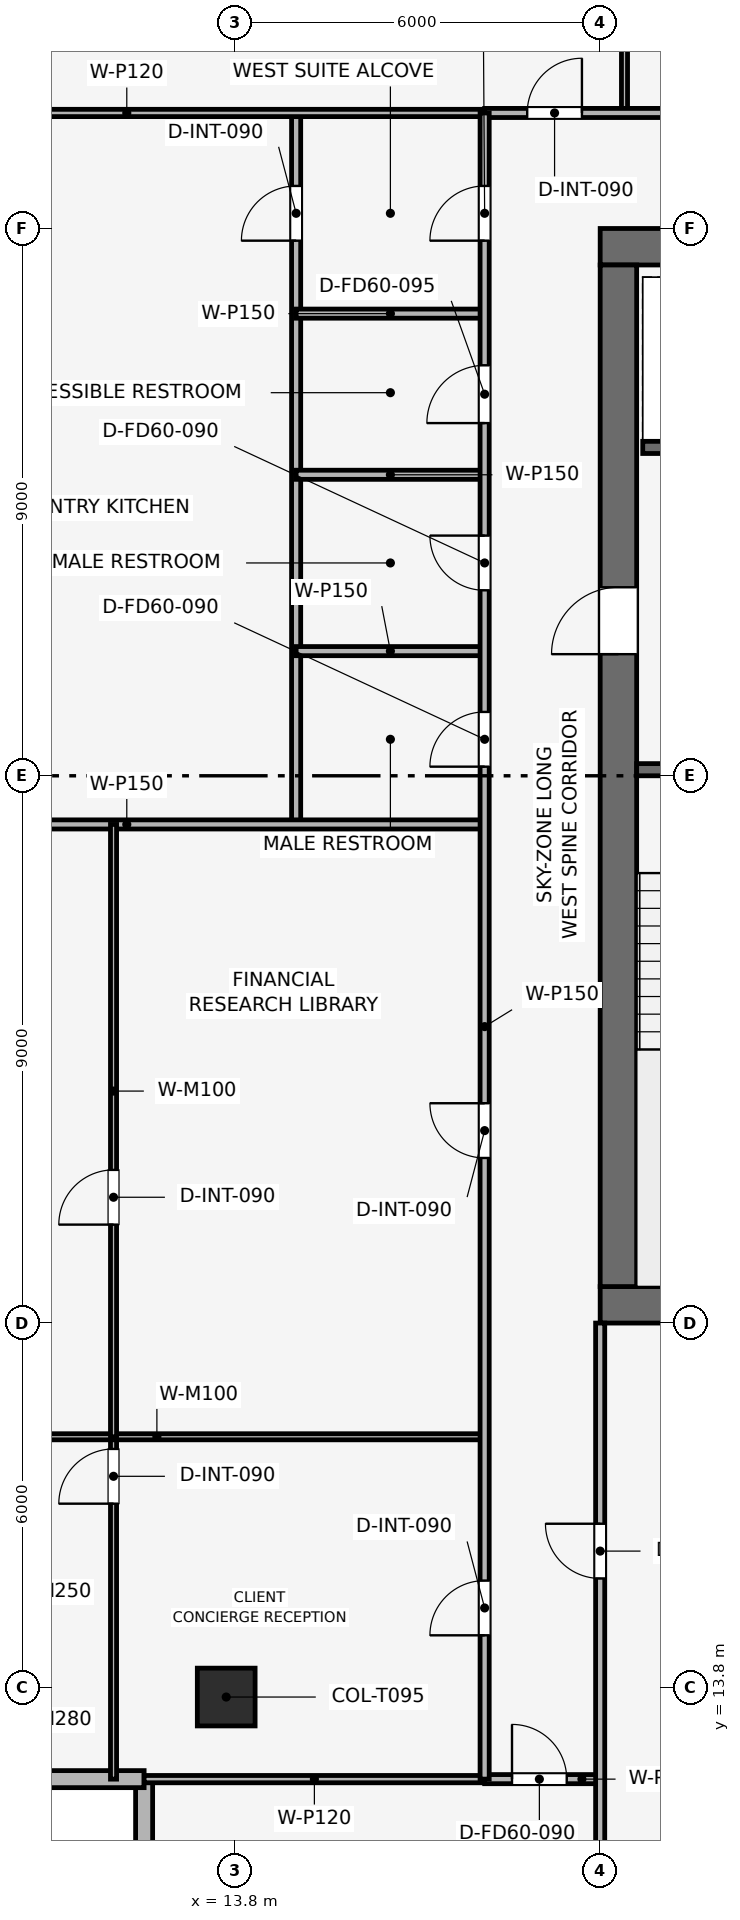
"""IFC4 building model, lengths in metres.
Left out: names, types, materials, properties, quantities, classifications, styles, units other than length and angle.
Written with IfcOpenShell. Run it as: python <this file> out.ifc"""

import sys

from ifc_helpers import new_model, si_unit, direction, frame, frame_2d, origin, origin_2d, place, context, subcontext, project, spatial, rectangle, extrude, element, fill, save


model = new_model("IFC4")
c1 = context("Model", 3, precision=1e-05, world=origin(), true_north=direction((0.0, 1.0)))
c2 = subcontext(c1, "Body", "Model", "MODEL_VIEW")
j1 = project(units=[si_unit("LENGTHUNIT", "METRE"), si_unit("PLANEANGLEUNIT", "RADIAN")], contexts=[c1])
p1 = place(None, origin())
s1 = spatial("IfcSite", under=j1, at=p1, CompositionType="ELEMENT")
p2 = place(p1, origin())
s2 = spatial("IfcBuilding", under=s1, at=p2, CompositionType="ELEMENT")
p3 = place(p2, frame((0.0, 0.0, 314.25)))
s3 = spatial("IfcBuildingStorey", under=s2, at=p3, CompositionType="ELEMENT", Elevation=314.25)
p4 = place(p3, frame((19.8, 20.1, 0.0), z_axis=(0.0, 0.0, 1.0), x_axis=(1.0, 0.0, 0.0)))
e1 = element("IfcWall", 1, at=p4, inside=s3, PredefinedType="SHEAR", context=c2, shape_type="SweptSolid", body=[
    extrude(rectangle(XDim=18.0, YDim=0.6, at=frame_2d((9.0, 0.0))), origin(), (0.0, 0.0, 1.0), 3.75),
])
p5 = place(p3, frame((19.8, 37.5, 0.0), z_axis=(0.0, 0.0, 1.0), x_axis=(1.0, 0.0, 0.0)))
e2 = element("IfcWall", 2, at=p5, inside=s3, PredefinedType="SHEAR", context=c2, shape_type="SweptSolid", body=[
    extrude(rectangle(XDim=18.0, YDim=0.6, at=frame_2d((9.0, 0.0))), origin(), (0.0, 0.0, 1.0), 3.75),
])
p6 = place(p5, frame((7.05, 0.0, 0.0)))
e3 = element("IfcOpeningElement", 3, at=p6, cuts=e2, PredefinedType="OPENING", context=c2, shape_type="SweptSolid", body=[
    extrude(rectangle(XDim=1.1, YDim=2.15, at=frame_2d((0.55, 1.075))), frame((0.0, 0.31, 0.0), z_axis=(0.0, -1.0, 0.0), x_axis=(1.0, 0.0, 0.0)), (0.0, 0.0, 1.0), 0.62),
])
p7 = place(p3, frame((20.1, 20.4, 0.0), z_axis=(0.0, 0.0, 1.0), x_axis=(0.0, 1.0, 0.0)))
e4 = element("IfcWall", 4, at=p7, inside=s3, PredefinedType="SHEAR", context=c2, shape_type="SweptSolid", body=[
    extrude(rectangle(XDim=16.8, YDim=0.6, at=frame_2d((8.4, 0.0))), origin(), (0.0, 0.0, 1.0), 3.75),
])
p8 = place(p7, frame((10.4, 0.0, 0.0)))
e5 = element("IfcOpeningElement", 5, at=p8, cuts=e4, PredefinedType="OPENING", context=c2, shape_type="SweptSolid", body=[
    extrude(rectangle(XDim=1.1, YDim=2.15, at=frame_2d((0.55, 1.075))), frame((0.0, 0.31, 0.0), z_axis=(0.0, -1.0, 0.0), x_axis=(1.0, 0.0, 0.0)), (0.0, 0.0, 1.0), 0.62),
])
p9 = place(p3, frame((13.65, 13.65, 0.003), z_axis=(0.0, 0.0, 1.0), x_axis=(1.0, 0.0, 0.0)))
e6 = element("IfcColumn", 6, at=p9, inside=s3, PredefinedType="COLUMN", context=c2, shape_type="SweptSolid", body=[
    extrude(rectangle(XDim=0.95, YDim=0.95, at=origin_2d()), origin(), (0.0, 0.0, 1.0), 3.504),
])
p10 = place(p3, frame((12.3, 6.13, 0.0), z_axis=(0.0, 0.0, 1.0), x_axis=(0.0, 1.0, 0.0)))
e7 = element("IfcWall", 7, at=p10, inside=s3, PredefinedType="SOLIDWALL", context=c2, shape_type="SweptSolid", body=[
    extrude(rectangle(XDim=6.17, YDim=0.28, at=frame_2d((3.085, 0.0))), origin(), (0.0, 0.0, 1.0), 3.51),
])
p11 = place(p10, frame((1.835, 0.0, 0.9)))
e8 = element("IfcOpeningElement", 8, at=p11, cuts=e7, PredefinedType="OPENING", context=c2, shape_type="SweptSolid", body=[
    extrude(rectangle(XDim=2.5, YDim=1.9, at=frame_2d((1.25, 0.95))), frame((0.0, 0.15, 0.0), z_axis=(0.0, -1.0, 0.0), x_axis=(1.0, 0.0, 0.0)), (0.0, 0.0, 1.0), 0.3),
])
p12 = place(p3, frame((12.3, 12.3, 0.0), z_axis=(0.0, 0.0, 1.0), x_axis=(-1.0, 0.0, 0.0)))
e9 = element("IfcWall", 9, at=p12, inside=s3, PredefinedType="SOLIDWALL", context=c2, shape_type="SweptSolid", body=[
    extrude(rectangle(XDim=6.17, YDim=0.28, at=frame_2d((3.085, 0.0))), origin(), (0.0, 0.0, 1.0), 3.51),
])
p13 = place(p12, frame((1.835, 0.0, 0.9)))
e10 = element("IfcOpeningElement", 10, at=p13, cuts=e9, PredefinedType="OPENING", context=c2, shape_type="SweptSolid", body=[
    extrude(rectangle(XDim=2.5, YDim=1.9, at=frame_2d((1.25, 0.95))), frame((0.0, 0.15, 0.0), z_axis=(0.0, -1.0, 0.0), x_axis=(1.0, 0.0, 0.0)), (0.0, 0.0, 1.0), 0.3),
])
p14 = place(p3, frame((20.4, 28.9, 0.0), z_axis=(0.0, 0.0, 1.0), x_axis=(1.0, 0.0, 0.0)))
e11 = element("IfcWall", 11, at=p14, inside=s3, PredefinedType="SHEAR", context=c2, shape_type="SweptSolid", body=[
    extrude(rectangle(XDim=3.15, YDim=0.2, at=frame_2d((1.575, 0.0))), origin(), (0.0, 0.0, 1.0), 3.51),
])
p15 = place(p14, frame((0.8, 0.0, 0.0)))
e12 = element("IfcOpeningElement", 12, at=p15, cuts=e11, PredefinedType="OPENING", context=c2, shape_type="SweptSolid", body=[
    extrude(rectangle(XDim=1.0, YDim=2.1, at=frame_2d((0.5, 1.05))), frame((0.0, 0.11, 0.0), z_axis=(0.0, -1.0, 0.0), x_axis=(1.0, 0.0, 0.0)), (0.0, 0.0, 1.0), 0.22),
])
p16 = place(p3, frame((20.5, 34.2, 0.0), z_axis=(0.0, 0.0, 1.0), x_axis=(1.0, 0.0, 0.0)))
e13 = element("IfcWall", 13, at=p16, inside=s3, PredefinedType="SHEAR", context=c2, shape_type="SweptSolid", body=[
    extrude(rectangle(XDim=3.05, YDim=0.2, at=frame_2d((1.525, 0.0))), origin(), (0.0, 0.0, 1.0), 3.51),
])
p17 = place(p16, frame((0.75, 0.0, 0.0)))
e14 = element("IfcOpeningElement", 14, at=p17, cuts=e13, PredefinedType="OPENING", context=c2, shape_type="SweptSolid", body=[
    extrude(rectangle(XDim=1.1, YDim=2.15, at=frame_2d((0.55, 1.075))), frame((0.0, 0.11, 0.0), z_axis=(0.0, -1.0, 0.0), x_axis=(1.0, 0.0, 0.0)), (0.0, 0.0, 1.0), 0.22),
])
p18 = place(p3, frame((20.2, 39.7, 0.0), z_axis=(0.0, 0.0, 1.0), x_axis=(0.0, 1.0, 0.0)))
e15 = element("IfcWall", 15, at=p18, inside=s3, PredefinedType="MOVABLE", context=c2, shape_type="SweptSolid", body=[
    extrude(rectangle(XDim=11.77, YDim=0.1, at=frame_2d((5.885, 0.0))), origin(), (0.0, 0.0, 1.0), 3.095),
])
p19 = place(p3, frame((14.8, 28.0, 0.0), z_axis=(0.0, 0.0, 1.0), x_axis=(0.0, 1.0, 0.0)))
e16 = element("IfcWall", 16, at=p19, inside=s3, PredefinedType="PARTITIONING", context=c2, shape_type="SweptSolid", body=[
    extrude(rectangle(XDim=11.7, YDim=0.15, at=frame_2d((5.85, 0.0))), origin(), (0.0, 0.0, 1.0), 3.095),
])
p20 = place(p19, frame((9.6, 0.0, 0.0)))
e17 = element("IfcOpeningElement", 17, at=p20, cuts=e16, PredefinedType="OPENING", context=c2, shape_type="SweptSolid", body=[
    extrude(rectangle(XDim=0.9, YDim=2.1, at=frame_2d((0.45, 1.05))), frame((0.0, 0.085, 0.0), z_axis=(0.0, -1.0, 0.0), x_axis=(1.0, 0.0, 0.0)), (0.0, 0.0, 1.0), 0.17),
])
p21 = place(p3, frame((6.13, 28.0, 0.0), z_axis=(0.0, 0.0, 1.0), x_axis=(1.0, 0.0, 0.0)))
e18 = element("IfcWall", 18, at=p21, inside=s3, PredefinedType="PARTITIONING", context=c2, shape_type="SweptSolid", body=[
    extrude(rectangle(XDim=11.77, YDim=0.15, at=frame_2d((5.885, 0.0))), origin(), (0.0, 0.0, 1.0), 3.135),
])
for number, where, z_axis, x_axis in (
    (19, (14.8, 36.4, 0.0), (0.0, 0.0, 1.0), (1.0, 0.0, 0.0)),
    (20, (14.8, 30.85, 0.0), (0.0, 0.0, 1.0), (1.0, 0.0, 0.0)),
    (21, (14.8, 33.75, 0.0), (0.0, 0.0, 1.0), (1.0, 0.0, 0.0)),
):
    element("IfcWall", number, at=place(p3, frame(where, z_axis=z_axis, x_axis=x_axis)), inside=s3, PredefinedType="PARTITIONING", context=c2, shape_type="SweptSolid", body=[
        extrude(rectangle(XDim=3.1, YDim=0.15, at=frame_2d((1.55, 0.0))), origin(), (0.0, 0.0, 1.0), 3.135),
    ])
p22 = place(p3, frame((11.797, 12.3, 0.0), z_axis=(0.0, 0.0, 1.0), x_axis=(0.0, 1.0, 0.0)))
e22 = element("IfcWall", 22, at=p22, inside=s3, PredefinedType="MOVABLE", context=c2, shape_type="SweptSolid", body=[
    extrude(rectangle(XDim=5.63, YDim=0.1, at=frame_2d((2.815, 0.0))), origin(), (0.0, 0.0, 1.0), 3.195),
])
p23 = place(p22, frame((4.53, 0.0, 0.0)))
e23 = element("IfcOpeningElement", 23, at=p23, cuts=e22, PredefinedType="OPENING", context=c2, shape_type="SweptSolid", body=[
    extrude(rectangle(XDim=0.9, YDim=2.1, at=frame_2d((0.45, 1.05))), frame((0.0, 0.06, 0.0), z_axis=(0.0, -1.0, 0.0), x_axis=(1.0, 0.0, 0.0)), (0.0, 0.0, 1.0), 0.12),
])
p24 = place(p3, frame((6.13, 17.93, 0.0), z_axis=(0.0, 0.0, 1.0), x_axis=(1.0, 0.0, 0.0)))
e24 = element("IfcWall", 24, at=p24, inside=s3, PredefinedType="MOVABLE", context=c2, shape_type="SweptSolid", body=[
    extrude(rectangle(XDim=11.77, YDim=0.1, at=frame_2d((5.885, 0.0))), origin(), (0.0, 0.0, 1.0), 3.095),
])
p25 = place(p3, frame((11.797, 17.93, 0.0), z_axis=(0.0, 0.0, 1.0), x_axis=(0.0, 1.0, 0.0)))
e25 = element("IfcWall", 25, at=p25, inside=s3, PredefinedType="MOVABLE", context=c2, shape_type="SweptSolid", body=[
    extrude(rectangle(XDim=10.07, YDim=0.1, at=frame_2d((5.035, 0.0))), origin(), (0.0, 0.0, 1.0), 3.095),
])
p26 = place(p25, frame((3.489, 0.0, 0.0)))
e26 = element("IfcOpeningElement", 26, at=p26, cuts=e25, PredefinedType="OPENING", context=c2, shape_type="SweptSolid", body=[
    extrude(rectangle(XDim=0.9, YDim=2.1, at=frame_2d((0.45, 1.05))), frame((0.0, 0.06, 0.0), z_axis=(0.0, -1.0, 0.0), x_axis=(1.0, 0.0, 0.0)), (0.0, 0.0, 1.0), 0.12),
])
p27 = place(p3, frame((12.3, 12.3, 0.0), z_axis=(0.0, 0.0, 1.0), x_axis=(1.0, 0.0, 0.0)))
e27 = element("IfcWall", 27, at=p27, inside=s3, PredefinedType="PARTITIONING", context=c2, shape_type="SweptSolid", body=[
    extrude(rectangle(XDim=5.6, YDim=0.12, at=frame_2d((2.8, 0.0))), origin(), (0.0, 0.0, 1.0), 3.195),
])
p28 = place(p3, frame((17.9, 12.3, 0.0), z_axis=(0.0, 0.0, 1.0), x_axis=(1.0, 0.0, 0.0)))
e28 = element("IfcWall", 28, at=p28, inside=s3, PredefinedType="PARTITIONING", context=c2, shape_type="SweptSolid", body=[
    extrude(rectangle(XDim=1.9, YDim=0.15, at=frame_2d((0.95, 0.0))), origin(), (0.0, 0.0, 1.0), 3.51),
])
p29 = place(p28, frame((0.45, 0.0, 0.0)))
e29 = element("IfcOpeningElement", 29, at=p29, cuts=e28, PredefinedType="OPENING", context=c2, shape_type="SweptSolid", body=[
    extrude(rectangle(XDim=0.9, YDim=2.1, at=frame_2d((0.45, 1.05))), frame((0.0, 0.085, 0.0), z_axis=(0.0, -1.0, 0.0), x_axis=(1.0, 0.0, 0.0)), (0.0, 0.0, 1.0), 0.17),
])
p30 = place(p3, frame((19.8, 6.13, 0.0), z_axis=(0.0, 0.0, 1.0), x_axis=(0.0, 1.0, 0.0)))
e30 = element("IfcWall", 30, at=p30, inside=s3, PredefinedType="PARTITIONING", context=c2, shape_type="SweptSolid", body=[
    extrude(rectangle(XDim=13.67, YDim=0.15, at=frame_2d((6.835, 0.0))), origin(), (0.0, 0.0, 1.0), 3.095),
])
p31 = place(p30, frame((9.47, 0.0, 0.0)))
e31 = element("IfcOpeningElement", 31, at=p31, cuts=e30, PredefinedType="OPENING", context=c2, shape_type="SweptSolid", body=[
    extrude(rectangle(XDim=0.9, YDim=2.1, at=frame_2d((0.45, 1.05))), frame((0.0, 0.085, 0.0), z_axis=(0.0, -1.0, 0.0), x_axis=(1.0, 0.0, 0.0)), (0.0, 0.0, 1.0), 0.17),
])
p32 = place(p3, frame((6.13, 39.7, 0.0), z_axis=(0.0, 0.0, 1.0), x_axis=(1.0, 0.0, 0.0)))
e32 = element("IfcWall", 32, at=p32, inside=s3, PredefinedType="PARTITIONING", context=c2, shape_type="SweptSolid", body=[
    extrude(rectangle(XDim=11.77, YDim=0.12, at=frame_2d((5.885, 0.0))), origin(), (0.0, 0.0, 1.0), 3.095),
])
p33 = place(p3, frame((17.9, 39.7, 0.0), z_axis=(0.0, 0.0, 1.0), x_axis=(1.0, 0.0, 0.0)))
e33 = element("IfcWall", 33, at=p33, inside=s3, PredefinedType="PARTITIONING", context=c2, shape_type="SweptSolid", body=[
    extrude(rectangle(XDim=21.8, YDim=0.15, at=frame_2d((10.9, 0.0))), origin(), (0.0, 0.0, 1.0), 3.095),
])
p34 = place(p33, frame((0.7, 0.0, 0.0)))
e34 = element("IfcOpeningElement", 34, at=p34, cuts=e33, PredefinedType="OPENING", context=c2, shape_type="SweptSolid", body=[
    extrude(rectangle(XDim=0.9, YDim=2.1, at=frame_2d((0.45, 1.05))), frame((0.0, 0.085, 0.0), z_axis=(0.0, -1.0, 0.0), x_axis=(1.0, 0.0, 0.0)), (0.0, 0.0, 1.0), 0.17),
])
p35 = place(p33, frame((6.053, 0.0, 0.0)))
e35 = element("IfcOpeningElement", 35, at=p35, cuts=e33, PredefinedType="OPENING", context=c2, shape_type="SweptSolid", body=[
    extrude(rectangle(XDim=0.9, YDim=2.1, at=frame_2d((0.45, 1.05))), frame((0.0, 0.085, 0.0), z_axis=(0.0, -1.0, 0.0), x_axis=(1.0, 0.0, 0.0)), (0.0, 0.0, 1.0), 0.17),
])
p36 = place(p33, frame((15.803, 0.0, 0.0)))
e36 = element("IfcOpeningElement", 36, at=p36, cuts=e33, PredefinedType="OPENING", context=c2, shape_type="SweptSolid", body=[
    extrude(rectangle(XDim=0.9, YDim=2.1, at=frame_2d((0.45, 1.05))), frame((0.0, 0.085, 0.0), z_axis=(0.0, -1.0, 0.0), x_axis=(1.0, 0.0, 0.0)), (0.0, 0.0, 1.0), 0.17),
])
p37 = place(p3, frame((17.9, 12.3, 0.0), z_axis=(0.0, 0.0, 1.0), x_axis=(0.0, 1.0, 0.0)))
e37 = element("IfcWall", 37, at=p37, inside=s3, PredefinedType="PARTITIONING", context=c2, shape_type="SweptSolid", body=[
    extrude(rectangle(XDim=27.4, YDim=0.15, at=frame_2d((13.7, 0.0))), origin(), (0.0, 0.0, 1.0), 3.095),
])
p38 = place(p37, frame((2.365, 0.0, 0.0)))
e38 = element("IfcOpeningElement", 38, at=p38, cuts=e37, PredefinedType="OPENING", context=c2, shape_type="SweptSolid", body=[
    extrude(rectangle(XDim=0.9, YDim=2.1, at=frame_2d((0.45, 1.05))), frame((0.0, 0.085, 0.0), z_axis=(0.0, -1.0, 0.0), x_axis=(1.0, 0.0, 0.0)), (0.0, 0.0, 1.0), 0.17),
])
p39 = place(p37, frame((10.215, 0.0, 0.0)))
e39 = element("IfcOpeningElement", 39, at=p39, cuts=e37, PredefinedType="OPENING", context=c2, shape_type="SweptSolid", body=[
    extrude(rectangle(XDim=0.9, YDim=2.1, at=frame_2d((0.45, 1.05))), frame((0.0, 0.085, 0.0), z_axis=(0.0, -1.0, 0.0), x_axis=(1.0, 0.0, 0.0)), (0.0, 0.0, 1.0), 0.17),
])
p40 = place(p37, frame((16.65, 0.0, 0.0)))
e40 = element("IfcOpeningElement", 40, at=p40, cuts=e37, PredefinedType="OPENING", context=c2, shape_type="SweptSolid", body=[
    extrude(rectangle(XDim=0.9, YDim=2.1, at=frame_2d((0.45, 1.05))), frame((0.0, 0.085, 0.0), z_axis=(0.0, -1.0, 0.0), x_axis=(1.0, 0.0, 0.0)), (0.0, 0.0, 1.0), 0.17),
])
p41 = place(p37, frame((19.55, 0.0, 0.0)))
e41 = element("IfcOpeningElement", 41, at=p41, cuts=e37, PredefinedType="OPENING", context=c2, shape_type="SweptSolid", body=[
    extrude(rectangle(XDim=0.9, YDim=2.1, at=frame_2d((0.45, 1.05))), frame((0.0, 0.085, 0.0), z_axis=(0.0, -1.0, 0.0), x_axis=(1.0, 0.0, 0.0)), (0.0, 0.0, 1.0), 0.17),
])
p42 = place(p37, frame((22.3, 0.0, 0.0)))
e42 = element("IfcOpeningElement", 42, at=p42, cuts=e37, PredefinedType="OPENING", context=c2, shape_type="SweptSolid", body=[
    extrude(rectangle(XDim=0.95, YDim=2.1, at=frame_2d((0.475, 1.05))), frame((0.0, 0.085, 0.0), z_axis=(0.0, -1.0, 0.0), x_axis=(1.0, 0.0, 0.0)), (0.0, 0.0, 1.0), 0.17),
])
p43 = place(p37, frame((25.3, 0.0, 0.0)))
e43 = element("IfcOpeningElement", 43, at=p43, cuts=e37, PredefinedType="OPENING", context=c2, shape_type="SweptSolid", body=[
    extrude(rectangle(XDim=0.9, YDim=2.1, at=frame_2d((0.45, 1.05))), frame((0.0, 0.085, 0.0), z_axis=(0.0, -1.0, 0.0), x_axis=(1.0, 0.0, 0.0)), (0.0, 0.0, 1.0), 0.17),
])
p44 = place(p20, origin())
e44 = element("IfcDoor", 44, at=p44, inside=s3, OperationType="SINGLE_SWING_LEFT", PredefinedType="DOOR", context=c2, shape_type="SweptSolid", body=[
    extrude(rectangle(XDim=0.9, YDim=2.1, at=frame_2d((0.45, 1.05))), frame((0.0, 0.025, 0.0), z_axis=(0.0, -1.0, 0.0), x_axis=(1.0, 0.0, 0.0)), (0.0, 0.0, 1.0), 0.05),
])
fill(e17, e44)
p45 = place(p23, origin())
e45 = element("IfcDoor", 45, at=p45, inside=s3, OperationType="SINGLE_SWING_LEFT", PredefinedType="DOOR", context=c2, shape_type="SweptSolid", body=[
    extrude(rectangle(XDim=0.9, YDim=2.1, at=frame_2d((0.45, 1.05))), frame((0.0, 0.025, 0.0), z_axis=(0.0, -1.0, 0.0), x_axis=(1.0, 0.0, 0.0)), (0.0, 0.0, 1.0), 0.05),
])
fill(e23, e45)
p46 = place(p26, origin())
e46 = element("IfcDoor", 46, at=p46, inside=s3, OperationType="SINGLE_SWING_LEFT", PredefinedType="DOOR", context=c2, shape_type="SweptSolid", body=[
    extrude(rectangle(XDim=0.9, YDim=2.1, at=frame_2d((0.45, 1.05))), frame((0.0, 0.025, 0.0), z_axis=(0.0, -1.0, 0.0), x_axis=(1.0, 0.0, 0.0)), (0.0, 0.0, 1.0), 0.05),
])
fill(e26, e46)
p47 = place(p29, origin())
e47 = element("IfcDoor", 47, at=p47, inside=s3, OperationType="SINGLE_SWING_LEFT", PredefinedType="DOOR", context=c2, shape_type="SweptSolid", body=[
    extrude(rectangle(XDim=0.9, YDim=2.1, at=frame_2d((0.45, 1.05))), frame((0.0, 0.025, 0.0), z_axis=(0.0, -1.0, 0.0), x_axis=(1.0, 0.0, 0.0)), (0.0, 0.0, 1.0), 0.05),
])
fill(e29, e47)
p48 = place(p31, origin())
e48 = element("IfcDoor", 48, at=p48, inside=s3, OperationType="SINGLE_SWING_RIGHT", PredefinedType="DOOR", context=c2, shape_type="SweptSolid", body=[
    extrude(rectangle(XDim=0.9, YDim=2.1, at=frame_2d((0.45, 1.05))), frame((0.0, 0.025, 0.0), z_axis=(0.0, -1.0, 0.0), x_axis=(1.0, 0.0, 0.0)), (0.0, 0.0, 1.0), 0.05),
])
fill(e31, e48)
p49 = place(p34, origin())
e49 = element("IfcDoor", 49, at=p49, inside=s3, OperationType="SINGLE_SWING_RIGHT", PredefinedType="DOOR", context=c2, shape_type="SweptSolid", body=[
    extrude(rectangle(XDim=0.9, YDim=2.1, at=frame_2d((0.45, 1.05))), frame((0.0, 0.025, 0.0), z_axis=(0.0, -1.0, 0.0), x_axis=(1.0, 0.0, 0.0)), (0.0, 0.0, 1.0), 0.05),
])
fill(e34, e49)
p50 = place(p38, origin())
e50 = element("IfcDoor", 50, at=p50, inside=s3, OperationType="SINGLE_SWING_LEFT", PredefinedType="DOOR", context=c2, shape_type="SweptSolid", body=[
    extrude(rectangle(XDim=0.9, YDim=2.1, at=frame_2d((0.45, 1.05))), frame((0.0, 0.025, 0.0), z_axis=(0.0, -1.0, 0.0), x_axis=(1.0, 0.0, 0.0)), (0.0, 0.0, 1.0), 0.05),
])
fill(e38, e50)
p51 = place(p39, origin())
e51 = element("IfcDoor", 51, at=p51, inside=s3, OperationType="SINGLE_SWING_RIGHT", PredefinedType="DOOR", context=c2, shape_type="SweptSolid", body=[
    extrude(rectangle(XDim=0.9, YDim=2.1, at=frame_2d((0.45, 1.05))), frame((0.0, 0.025, 0.0), z_axis=(0.0, -1.0, 0.0), x_axis=(1.0, 0.0, 0.0)), (0.0, 0.0, 1.0), 0.05),
])
fill(e39, e51)
p52 = place(p40, origin())
e52 = element("IfcDoor", 52, at=p52, inside=s3, OperationType="SINGLE_SWING_LEFT", PredefinedType="DOOR", context=c2, shape_type="SweptSolid", body=[
    extrude(rectangle(XDim=0.9, YDim=2.1, at=frame_2d((0.45, 1.05))), frame((0.0, 0.025, 0.0), z_axis=(0.0, -1.0, 0.0), x_axis=(1.0, 0.0, 0.0)), (0.0, 0.0, 1.0), 0.05),
])
fill(e40, e52)
p53 = place(p41, origin())
e53 = element("IfcDoor", 53, at=p53, inside=s3, OperationType="SINGLE_SWING_RIGHT", PredefinedType="DOOR", context=c2, shape_type="SweptSolid", body=[
    extrude(rectangle(XDim=0.9, YDim=2.1, at=frame_2d((0.45, 1.05))), frame((0.0, 0.025, 0.0), z_axis=(0.0, -1.0, 0.0), x_axis=(1.0, 0.0, 0.0)), (0.0, 0.0, 1.0), 0.05),
])
fill(e41, e53)
p54 = place(p42, origin())
e54 = element("IfcDoor", 54, at=p54, inside=s3, OperationType="SINGLE_SWING_LEFT", PredefinedType="DOOR", context=c2, shape_type="SweptSolid", body=[
    extrude(rectangle(XDim=0.95, YDim=2.1, at=frame_2d((0.475, 1.05))), frame((0.0, 0.025, 0.0), z_axis=(0.0, -1.0, 0.0), x_axis=(1.0, 0.0, 0.0)), (0.0, 0.0, 1.0), 0.05),
])
fill(e42, e54)
p55 = place(p43, origin())
e55 = element("IfcDoor", 55, at=p55, inside=s3, OperationType="SINGLE_SWING_LEFT", PredefinedType="DOOR", context=c2, shape_type="SweptSolid", body=[
    extrude(rectangle(XDim=0.9, YDim=2.1, at=frame_2d((0.45, 1.05))), frame((0.0, 0.025, 0.0), z_axis=(0.0, -1.0, 0.0), x_axis=(1.0, 0.0, 0.0)), (0.0, 0.0, 1.0), 0.05),
])
fill(e43, e55)
p56 = place(p8, origin())
e56 = element("IfcDoor", 56, at=p56, inside=s3, OperationType="SINGLE_SWING_LEFT", PredefinedType="DOOR", context=c2, shape_type="SweptSolid", body=[
    extrude(rectangle(XDim=1.1, YDim=2.15, at=frame_2d((0.55, 1.075))), frame((0.0, 0.025, 0.0), z_axis=(0.0, -1.0, 0.0), x_axis=(1.0, 0.0, 0.0)), (0.0, 0.0, 1.0), 0.05),
])
fill(e5, e56)
save(model, sys.argv[1])
